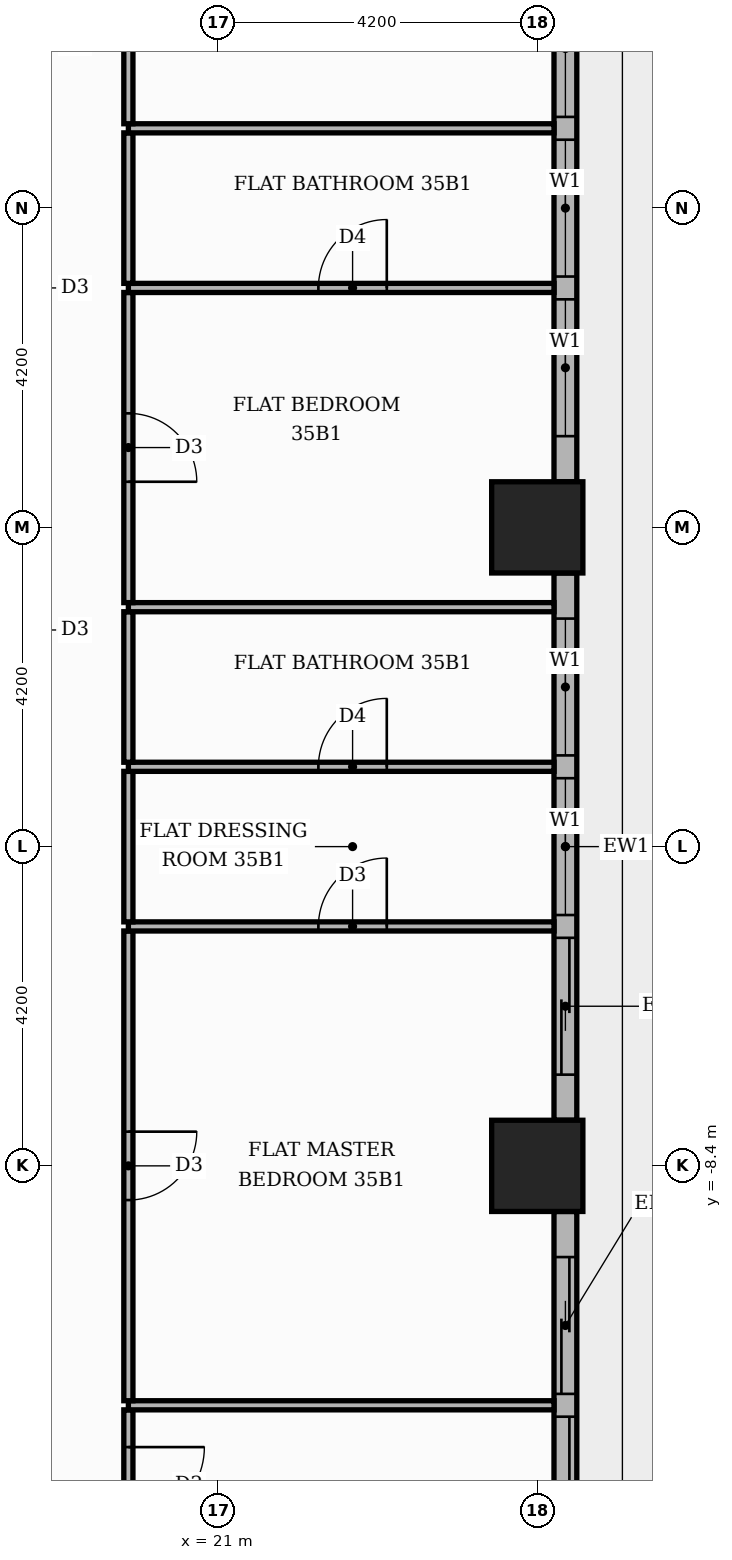
"""IFC4 building model, lengths in metres.
Left out: names, types, materials, properties, quantities, classifications, styles, units other than length and angle.
Written with IfcOpenShell. Run it as: python <this file> out.ifc"""

import sys

from ifc_helpers import new_model, si_unit, direction, frame, frame_2d, origin, origin_2d, place, context, subcontext, project, spatial, rectangle, extrude, element, fill, save


model = new_model("IFC4")
c1 = context("Model", 3, precision=1e-05, world=origin(), true_north=direction((0.0, 1.0)))
c2 = subcontext(c1, "Body", "Model", "MODEL_VIEW")
j1 = project(units=[si_unit("LENGTHUNIT", "METRE"), si_unit("PLANEANGLEUNIT", "RADIAN")], contexts=[c1])
p1 = place(None, origin())
s1 = spatial("IfcSite", under=j1, at=p1, CompositionType="ELEMENT")
p2 = place(p1, origin())
s2 = spatial("IfcBuilding", under=s1, at=p2, CompositionType="ELEMENT")
p3 = place(p2, frame((0.0, 0.0, 149.4)))
s3 = spatial("IfcBuildingStorey", under=s2, at=p3, CompositionType="ELEMENT", Elevation=149.4)
for number, where, z_axis, x_axis in (
    (1, (25.2, 0.0, 0.0), (0.0, 0.0, 1.0), (1.0, 0.0, 0.0)),
    (2, (25.2, -8.4, 0.0), (0.0, 0.0, 1.0), (1.0, 0.0, 0.0)),
):
    element("IfcColumn", number, at=place(p3, frame(where, z_axis=z_axis, x_axis=x_axis)), inside=s3, PredefinedType="COLUMN", context=c2, shape_type="SweptSolid", body=[
        extrude(rectangle(XDim=1.2, YDim=1.2, at=origin_2d()), origin(), (0.0, 0.0, 1.0), 3.9),
    ])
p4 = place(p3, frame((25.57, -16.2, 0.0), z_axis=(0.0, 0.0, 1.0), x_axis=(0.0, 1.0, 0.0)))
e3 = element("IfcWall", 3, at=p4, inside=s3, PredefinedType="STANDARD", context=c2, shape_type="SweptSolid", body=[
    extrude(rectangle(XDim=7.2, YDim=0.3, at=frame_2d((3.6, 0.0))), origin(), (0.0, 0.0, 1.0), 3.48),
])
p5 = place(p4, frame((0.6, 0.0, 0.0)))
e4 = element("IfcOpeningElement", 4, at=p5, cuts=e3, PredefinedType="OPENING", context=c2, shape_type="SweptSolid", body=[
    extrude(rectangle(XDim=3.9, YDim=2.4, at=frame_2d((1.95, 1.2))), frame((0.0, 0.16, 0.0), z_axis=(0.0, -1.0, 0.0), x_axis=(1.0, 0.0, 0.0)), (0.0, 0.0, 1.0), 0.32),
])
p6 = place(p4, frame((4.8, 0.0, 0.0)))
e5 = element("IfcOpeningElement", 5, at=p6, cuts=e3, PredefinedType="OPENING", context=c2, shape_type="SweptSolid", body=[
    extrude(rectangle(XDim=1.8, YDim=2.4, at=frame_2d((0.9, 1.2))), frame((0.0, 0.16, 0.0), z_axis=(0.0, -1.0, 0.0), x_axis=(1.0, 0.0, 0.0)), (0.0, 0.0, 1.0), 0.32),
])
p7 = place(p3, frame((25.57, -7.8, 0.0), z_axis=(0.0, 0.0, 1.0), x_axis=(0.0, 1.0, 0.0)))
e6 = element("IfcWall", 6, at=p7, inside=s3, PredefinedType="STANDARD", context=c2, shape_type="SweptSolid", body=[
    extrude(rectangle(XDim=7.2, YDim=0.3, at=frame_2d((3.6, 0.0))), origin(), (0.0, 0.0, 1.0), 3.48),
])
p8 = place(p7, frame((0.6, 0.0, 0.0)))
e7 = element("IfcOpeningElement", 7, at=p8, cuts=e6, PredefinedType="OPENING", context=c2, shape_type="SweptSolid", body=[
    extrude(rectangle(XDim=1.8, YDim=2.4, at=frame_2d((0.9, 1.2))), frame((0.0, 0.16, 0.0), z_axis=(0.0, -1.0, 0.0), x_axis=(1.0, 0.0, 0.0)), (0.0, 0.0, 1.0), 0.32),
])
p9 = place(p7, frame((2.7, 0.0, 0.9)))
e8 = element("IfcOpeningElement", 8, at=p9, cuts=e6, PredefinedType="OPENING", context=c2, shape_type="SweptSolid", body=[
    extrude(rectangle(XDim=1.8, YDim=2.1, at=frame_2d((0.9, 1.05))), frame((0.0, 0.16, 0.0), z_axis=(0.0, -1.0, 0.0), x_axis=(1.0, 0.0, 0.0)), (0.0, 0.0, 1.0), 0.32),
])
p10 = place(p7, frame((4.8, 0.0, 0.9)))
e9 = element("IfcOpeningElement", 9, at=p10, cuts=e6, PredefinedType="OPENING", context=c2, shape_type="SweptSolid", body=[
    extrude(rectangle(XDim=1.8, YDim=2.1, at=frame_2d((0.9, 1.05))), frame((0.0, 0.16, 0.0), z_axis=(0.0, -1.0, 0.0), x_axis=(1.0, 0.0, 0.0)), (0.0, 0.0, 1.0), 0.32),
])
p11 = place(p3, frame((25.57, 0.6, 0.0), z_axis=(0.0, 0.0, 1.0), x_axis=(0.0, 1.0, 0.0)))
e10 = element("IfcWall", 10, at=p11, inside=s3, PredefinedType="STANDARD", context=c2, shape_type="SweptSolid", body=[
    extrude(rectangle(XDim=7.2, YDim=0.3, at=frame_2d((3.6, 0.0))), origin(), (0.0, 0.0, 1.0), 3.48),
])
p12 = place(p11, frame((0.6, 0.0, 0.9)))
e11 = element("IfcOpeningElement", 11, at=p12, cuts=e10, PredefinedType="OPENING", context=c2, shape_type="SweptSolid", body=[
    extrude(rectangle(XDim=1.8, YDim=2.1, at=frame_2d((0.9, 1.05))), frame((0.0, 0.16, 0.0), z_axis=(0.0, -1.0, 0.0), x_axis=(1.0, 0.0, 0.0)), (0.0, 0.0, 1.0), 0.32),
])
p13 = place(p11, frame((2.7, 0.0, 0.9)))
e12 = element("IfcOpeningElement", 12, at=p13, cuts=e10, PredefinedType="OPENING", context=c2, shape_type="SweptSolid", body=[
    extrude(rectangle(XDim=1.8, YDim=2.1, at=frame_2d((0.9, 1.05))), frame((0.0, 0.16, 0.0), z_axis=(0.0, -1.0, 0.0), x_axis=(1.0, 0.0, 0.0)), (0.0, 0.0, 1.0), 0.32),
])
p14 = place(p11, frame((4.8, 0.0, 0.9)))
e13 = element("IfcOpeningElement", 13, at=p14, cuts=e10, PredefinedType="OPENING", context=c2, shape_type="SweptSolid", body=[
    extrude(rectangle(XDim=1.8, YDim=2.1, at=frame_2d((0.9, 1.05))), frame((0.0, 0.16, 0.0), z_axis=(0.0, -1.0, 0.0), x_axis=(1.0, 0.0, 0.0)), (0.0, 0.0, 1.0), 0.32),
])
p15 = place(p3, frame((19.82, -13.59, 0.0), z_axis=(0.0, 0.0, 1.0), x_axis=(0.0, 1.0, 0.0)))
e14 = element("IfcWall", 14, at=p15, inside=s3, PredefinedType="PARTITIONING", context=c2, shape_type="SweptSolid", body=[
    extrude(rectangle(XDim=1.98, YDim=0.12, at=frame_2d((0.99, 0.0))), origin(), (0.0, 0.0, 1.0), 3.48),
])
p16 = place(p15, frame((0.49, 0.0, 0.0)))
e15 = element("IfcOpeningElement", 15, at=p16, cuts=e14, PredefinedType="OPENING", context=c2, shape_type="SweptSolid", body=[
    extrude(rectangle(XDim=1.0, YDim=2.1, at=frame_2d((0.5, 1.05))), frame((0.0, 0.07, 0.0), z_axis=(0.0, -1.0, 0.0), x_axis=(1.0, 0.0, 0.0)), (0.0, 0.0, 1.0), 0.14),
])
p17 = place(p3, frame((19.82, -11.55, 0.0), z_axis=(0.0, 0.0, 1.0), x_axis=(1.0, 0.0, 0.0)))
e16 = element("IfcWall", 16, at=p17, inside=s3, PredefinedType="PARTITIONING", context=c2, shape_type="SweptSolid", body=[
    extrude(rectangle(XDim=5.6, YDim=0.12, at=frame_2d((2.8, 0.0))), origin(), (0.0, 0.0, 1.0), 3.48),
])
p18 = place(p3, frame((19.82, -11.49, 0.0), z_axis=(0.0, 0.0, 1.0), x_axis=(0.0, 1.0, 0.0)))
e17 = element("IfcWall", 17, at=p18, inside=s3, PredefinedType="PARTITIONING", context=c2, shape_type="SweptSolid", body=[
    extrude(rectangle(XDim=6.18, YDim=0.12, at=frame_2d((3.09, 0.0))), origin(), (0.0, 0.0, 1.0), 3.48),
])
p19 = place(p18, frame((2.64, 0.0, 0.0)))
e18 = element("IfcOpeningElement", 18, at=p19, cuts=e17, PredefinedType="OPENING", context=c2, shape_type="SweptSolid", body=[
    extrude(rectangle(XDim=0.9, YDim=2.1, at=frame_2d((0.45, 1.05))), frame((0.0, 0.07, 0.0), z_axis=(0.0, -1.0, 0.0), x_axis=(1.0, 0.0, 0.0)), (0.0, 0.0, 1.0), 0.14),
])
p20 = place(p3, frame((19.82, -5.25, 0.0), z_axis=(0.0, 0.0, 1.0), x_axis=(1.0, 0.0, 0.0)))
e19 = element("IfcWall", 19, at=p20, inside=s3, PredefinedType="PARTITIONING", context=c2, shape_type="SweptSolid", body=[
    extrude(rectangle(XDim=5.6, YDim=0.12, at=frame_2d((2.8, 0.0))), origin(), (0.0, 0.0, 1.0), 3.48),
])
p21 = place(p20, frame((2.5, 0.0, 0.0)))
e20 = element("IfcOpeningElement", 20, at=p21, cuts=e19, PredefinedType="OPENING", context=c2, shape_type="SweptSolid", body=[
    extrude(rectangle(XDim=0.9, YDim=2.1, at=frame_2d((0.45, 1.05))), frame((0.0, 0.07, 0.0), z_axis=(0.0, -1.0, 0.0), x_axis=(1.0, 0.0, 0.0)), (0.0, 0.0, 1.0), 0.14),
])
p22 = place(p3, frame((19.82, -5.19, 0.0), z_axis=(0.0, 0.0, 1.0), x_axis=(0.0, 1.0, 0.0)))
e21 = element("IfcWall", 21, at=p22, inside=s3, PredefinedType="PARTITIONING", context=c2, shape_type="SweptSolid", body=[
    extrude(rectangle(XDim=1.98, YDim=0.12, at=frame_2d((0.99, 0.0))), origin(), (0.0, 0.0, 1.0), 3.48),
])
p23 = place(p3, frame((19.82, -3.15, 0.0), z_axis=(0.0, 0.0, 1.0), x_axis=(1.0, 0.0, 0.0)))
e22 = element("IfcWall", 22, at=p23, inside=s3, PredefinedType="PARTITIONING", context=c2, shape_type="SweptSolid", body=[
    extrude(rectangle(XDim=5.6, YDim=0.12, at=frame_2d((2.8, 0.0))), origin(), (0.0, 0.0, 1.0), 3.48),
])
p24 = place(p23, frame((2.5, 0.0, 0.0)))
e23 = element("IfcOpeningElement", 23, at=p24, cuts=e22, PredefinedType="OPENING", context=c2, shape_type="SweptSolid", body=[
    extrude(rectangle(XDim=0.9, YDim=2.1, at=frame_2d((0.45, 1.05))), frame((0.0, 0.07, 0.0), z_axis=(0.0, -1.0, 0.0), x_axis=(1.0, 0.0, 0.0)), (0.0, 0.0, 1.0), 0.14),
])
p25 = place(p3, frame((19.82, -3.09, 0.0), z_axis=(0.0, 0.0, 1.0), x_axis=(0.0, 1.0, 0.0)))
e24 = element("IfcWall", 24, at=p25, inside=s3, PredefinedType="PARTITIONING", context=c2, shape_type="SweptSolid", body=[
    extrude(rectangle(XDim=1.98, YDim=0.12, at=frame_2d((0.99, 0.0))), origin(), (0.0, 0.0, 1.0), 3.48),
])
p26 = place(p3, frame((19.82, -1.05, 0.0), z_axis=(0.0, 0.0, 1.0), x_axis=(1.0, 0.0, 0.0)))
e25 = element("IfcWall", 25, at=p26, inside=s3, PredefinedType="PARTITIONING", context=c2, shape_type="SweptSolid", body=[
    extrude(rectangle(XDim=5.6, YDim=0.12, at=frame_2d((2.8, 0.0))), origin(), (0.0, 0.0, 1.0), 3.48),
])
p27 = place(p3, frame((19.82, -0.99, 0.0), z_axis=(0.0, 0.0, 1.0), x_axis=(0.0, 1.0, 0.0)))
e26 = element("IfcWall", 26, at=p27, inside=s3, PredefinedType="PARTITIONING", context=c2, shape_type="SweptSolid", body=[
    extrude(rectangle(XDim=4.08, YDim=0.12, at=frame_2d((2.04, 0.0))), origin(), (0.0, 0.0, 1.0), 3.48),
])
p28 = place(p27, frame((1.59, 0.0, 0.0)))
e27 = element("IfcOpeningElement", 27, at=p28, cuts=e26, PredefinedType="OPENING", context=c2, shape_type="SweptSolid", body=[
    extrude(rectangle(XDim=0.9, YDim=2.1, at=frame_2d((0.45, 1.05))), frame((0.0, 0.07, 0.0), z_axis=(0.0, -1.0, 0.0), x_axis=(1.0, 0.0, 0.0)), (0.0, 0.0, 1.0), 0.14),
])
p29 = place(p3, frame((19.82, 3.15, 0.0), z_axis=(0.0, 0.0, 1.0), x_axis=(1.0, 0.0, 0.0)))
e28 = element("IfcWall", 28, at=p29, inside=s3, PredefinedType="PARTITIONING", context=c2, shape_type="SweptSolid", body=[
    extrude(rectangle(XDim=5.6, YDim=0.12, at=frame_2d((2.8, 0.0))), origin(), (0.0, 0.0, 1.0), 3.48),
])
p30 = place(p29, frame((2.5, 0.0, 0.0)))
e29 = element("IfcOpeningElement", 29, at=p30, cuts=e28, PredefinedType="OPENING", context=c2, shape_type="SweptSolid", body=[
    extrude(rectangle(XDim=0.9, YDim=2.1, at=frame_2d((0.45, 1.05))), frame((0.0, 0.07, 0.0), z_axis=(0.0, -1.0, 0.0), x_axis=(1.0, 0.0, 0.0)), (0.0, 0.0, 1.0), 0.14),
])
p31 = place(p3, frame((19.82, 3.21, 0.0), z_axis=(0.0, 0.0, 1.0), x_axis=(0.0, 1.0, 0.0)))
e30 = element("IfcWall", 30, at=p31, inside=s3, PredefinedType="PARTITIONING", context=c2, shape_type="SweptSolid", body=[
    extrude(rectangle(XDim=1.98, YDim=0.12, at=frame_2d((0.99, 0.0))), origin(), (0.0, 0.0, 1.0), 3.48),
])
p32 = place(p3, frame((19.82, 5.25, 0.0), z_axis=(0.0, 0.0, 1.0), x_axis=(1.0, 0.0, 0.0)))
e31 = element("IfcWall", 31, at=p32, inside=s3, PredefinedType="PARTITIONING", context=c2, shape_type="SweptSolid", body=[
    extrude(rectangle(XDim=5.6, YDim=0.12, at=frame_2d((2.8, 0.0))), origin(), (0.0, 0.0, 1.0), 3.48),
])
p33 = place(p3, frame((19.82, 5.31, 0.0), z_axis=(0.0, 0.0, 1.0), x_axis=(0.0, 1.0, 0.0)))
e32 = element("IfcWall", 32, at=p33, inside=s3, PredefinedType="PARTITIONING", context=c2, shape_type="SweptSolid", body=[
    extrude(rectangle(XDim=6.18, YDim=0.12, at=frame_2d((3.09, 0.0))), origin(), (0.0, 0.0, 1.0), 3.48),
])
p34 = place(p33, frame((2.64, 0.0, 0.0)))
e33 = element("IfcOpeningElement", 33, at=p34, cuts=e32, PredefinedType="OPENING", context=c2, shape_type="SweptSolid", body=[
    extrude(rectangle(XDim=0.9, YDim=2.1, at=frame_2d((0.45, 1.05))), frame((0.0, 0.07, 0.0), z_axis=(0.0, -1.0, 0.0), x_axis=(1.0, 0.0, 0.0)), (0.0, 0.0, 1.0), 0.14),
])
p35 = place(p5, origin())
e34 = element("IfcDoor", 34, at=p35, inside=s3, OperationType="SLIDING_TO_LEFT", PredefinedType="DOOR", context=c2, shape_type="SweptSolid", body=[
    extrude(rectangle(XDim=3.9, YDim=2.4, at=frame_2d((1.95, 1.2))), frame((0.0, 0.025, 0.0), z_axis=(0.0, -1.0, 0.0), x_axis=(1.0, 0.0, 0.0)), (0.0, 0.0, 1.0), 0.05),
])
fill(e4, e34)
p36 = place(p6, origin())
e35 = element("IfcDoor", 35, at=p36, inside=s3, OperationType="SLIDING_TO_RIGHT", PredefinedType="DOOR", context=c2, shape_type="SweptSolid", body=[
    extrude(rectangle(XDim=1.8, YDim=2.4, at=frame_2d((0.9, 1.2))), frame((0.0, 0.025, 0.0), z_axis=(0.0, -1.0, 0.0), x_axis=(1.0, 0.0, 0.0)), (0.0, 0.0, 1.0), 0.05),
])
fill(e5, e35)
p37 = place(p8, origin())
e36 = element("IfcDoor", 36, at=p37, inside=s3, OperationType="SLIDING_TO_LEFT", PredefinedType="DOOR", context=c2, shape_type="SweptSolid", body=[
    extrude(rectangle(XDim=1.8, YDim=2.4, at=frame_2d((0.9, 1.2))), frame((0.0, 0.025, 0.0), z_axis=(0.0, -1.0, 0.0), x_axis=(1.0, 0.0, 0.0)), (0.0, 0.0, 1.0), 0.05),
])
fill(e7, e36)
p38 = place(p9, origin())
e37 = element("IfcWindow", 37, at=p38, inside=s3, PartitioningType="SINGLE_PANEL", PredefinedType="WINDOW", context=c2, shape_type="SweptSolid", body=[
    extrude(rectangle(XDim=1.8, YDim=2.1, at=frame_2d((0.9, 1.05))), frame((0.0, 0.03, 0.0), z_axis=(0.0, -1.0, 0.0), x_axis=(1.0, 0.0, 0.0)), (0.0, 0.0, 1.0), 0.06),
])
fill(e8, e37)
p39 = place(p10, origin())
e38 = element("IfcWindow", 38, at=p39, inside=s3, PartitioningType="SINGLE_PANEL", PredefinedType="WINDOW", context=c2, shape_type="SweptSolid", body=[
    extrude(rectangle(XDim=1.8, YDim=2.1, at=frame_2d((0.9, 1.05))), frame((0.0, 0.03, 0.0), z_axis=(0.0, -1.0, 0.0), x_axis=(1.0, 0.0, 0.0)), (0.0, 0.0, 1.0), 0.06),
])
fill(e9, e38)
p40 = place(p12, origin())
e39 = element("IfcWindow", 39, at=p40, inside=s3, PartitioningType="SINGLE_PANEL", PredefinedType="WINDOW", context=c2, shape_type="SweptSolid", body=[
    extrude(rectangle(XDim=1.8, YDim=2.1, at=frame_2d((0.9, 1.05))), frame((0.0, 0.03, 0.0), z_axis=(0.0, -1.0, 0.0), x_axis=(1.0, 0.0, 0.0)), (0.0, 0.0, 1.0), 0.06),
])
fill(e11, e39)
p41 = place(p13, origin())
e40 = element("IfcWindow", 40, at=p41, inside=s3, PartitioningType="SINGLE_PANEL", PredefinedType="WINDOW", context=c2, shape_type="SweptSolid", body=[
    extrude(rectangle(XDim=1.8, YDim=2.1, at=frame_2d((0.9, 1.05))), frame((0.0, 0.03, 0.0), z_axis=(0.0, -1.0, 0.0), x_axis=(1.0, 0.0, 0.0)), (0.0, 0.0, 1.0), 0.06),
])
fill(e12, e40)
p42 = place(p14, origin())
e41 = element("IfcWindow", 41, at=p42, inside=s3, PartitioningType="SINGLE_PANEL", PredefinedType="WINDOW", context=c2, shape_type="SweptSolid", body=[
    extrude(rectangle(XDim=1.8, YDim=2.1, at=frame_2d((0.9, 1.05))), frame((0.0, 0.03, 0.0), z_axis=(0.0, -1.0, 0.0), x_axis=(1.0, 0.0, 0.0)), (0.0, 0.0, 1.0), 0.06),
])
fill(e13, e41)
p43 = place(p16, frame((1.0, 0.0, 0.0), z_axis=(0.0, 0.0, 1.0), x_axis=(-1.0, 0.0, 0.0)))
e42 = element("IfcDoor", 42, at=p43, inside=s3, OperationType="SINGLE_SWING_RIGHT", PredefinedType="DOOR", context=c2, shape_type="SweptSolid", body=[
    extrude(rectangle(XDim=1.0, YDim=2.1, at=frame_2d((0.5, 1.05))), frame((0.0, 0.025, 0.0), z_axis=(0.0, -1.0, 0.0), x_axis=(1.0, 0.0, 0.0)), (0.0, 0.0, 1.0), 0.05),
])
fill(e15, e42)
p44 = place(p19, frame((0.9, 0.0, 0.0), z_axis=(0.0, 0.0, 1.0), x_axis=(-1.0, 0.0, 0.0)))
e43 = element("IfcDoor", 43, at=p44, inside=s3, OperationType="SINGLE_SWING_RIGHT", PredefinedType="DOOR", context=c2, shape_type="SweptSolid", body=[
    extrude(rectangle(XDim=0.9, YDim=2.1, at=frame_2d((0.45, 1.05))), frame((0.0, 0.025, 0.0), z_axis=(0.0, -1.0, 0.0), x_axis=(1.0, 0.0, 0.0)), (0.0, 0.0, 1.0), 0.05),
])
fill(e18, e43)
p45 = place(p21, origin())
e44 = element("IfcDoor", 44, at=p45, inside=s3, OperationType="SINGLE_SWING_RIGHT", PredefinedType="DOOR", context=c2, shape_type="SweptSolid", body=[
    extrude(rectangle(XDim=0.9, YDim=2.1, at=frame_2d((0.45, 1.05))), frame((0.0, 0.025, 0.0), z_axis=(0.0, -1.0, 0.0), x_axis=(1.0, 0.0, 0.0)), (0.0, 0.0, 1.0), 0.05),
])
fill(e20, e44)
p46 = place(p24, origin())
e45 = element("IfcDoor", 45, at=p46, inside=s3, OperationType="SINGLE_SWING_RIGHT", PredefinedType="DOOR", context=c2, shape_type="SweptSolid", body=[
    extrude(rectangle(XDim=0.9, YDim=2.1, at=frame_2d((0.45, 1.05))), frame((0.0, 0.025, 0.0), z_axis=(0.0, -1.0, 0.0), x_axis=(1.0, 0.0, 0.0)), (0.0, 0.0, 1.0), 0.05),
])
fill(e23, e45)
p47 = place(p28, frame((0.9, 0.0, 0.0), z_axis=(0.0, 0.0, 1.0), x_axis=(-1.0, 0.0, 0.0)))
e46 = element("IfcDoor", 46, at=p47, inside=s3, OperationType="SINGLE_SWING_LEFT", PredefinedType="DOOR", context=c2, shape_type="SweptSolid", body=[
    extrude(rectangle(XDim=0.9, YDim=2.1, at=frame_2d((0.45, 1.05))), frame((0.0, 0.025, 0.0), z_axis=(0.0, -1.0, 0.0), x_axis=(1.0, 0.0, 0.0)), (0.0, 0.0, 1.0), 0.05),
])
fill(e27, e46)
p48 = place(p30, origin())
e47 = element("IfcDoor", 47, at=p48, inside=s3, OperationType="SINGLE_SWING_RIGHT", PredefinedType="DOOR", context=c2, shape_type="SweptSolid", body=[
    extrude(rectangle(XDim=0.9, YDim=2.1, at=frame_2d((0.45, 1.05))), frame((0.0, 0.025, 0.0), z_axis=(0.0, -1.0, 0.0), x_axis=(1.0, 0.0, 0.0)), (0.0, 0.0, 1.0), 0.05),
])
fill(e29, e47)
save(model, sys.argv[1])
